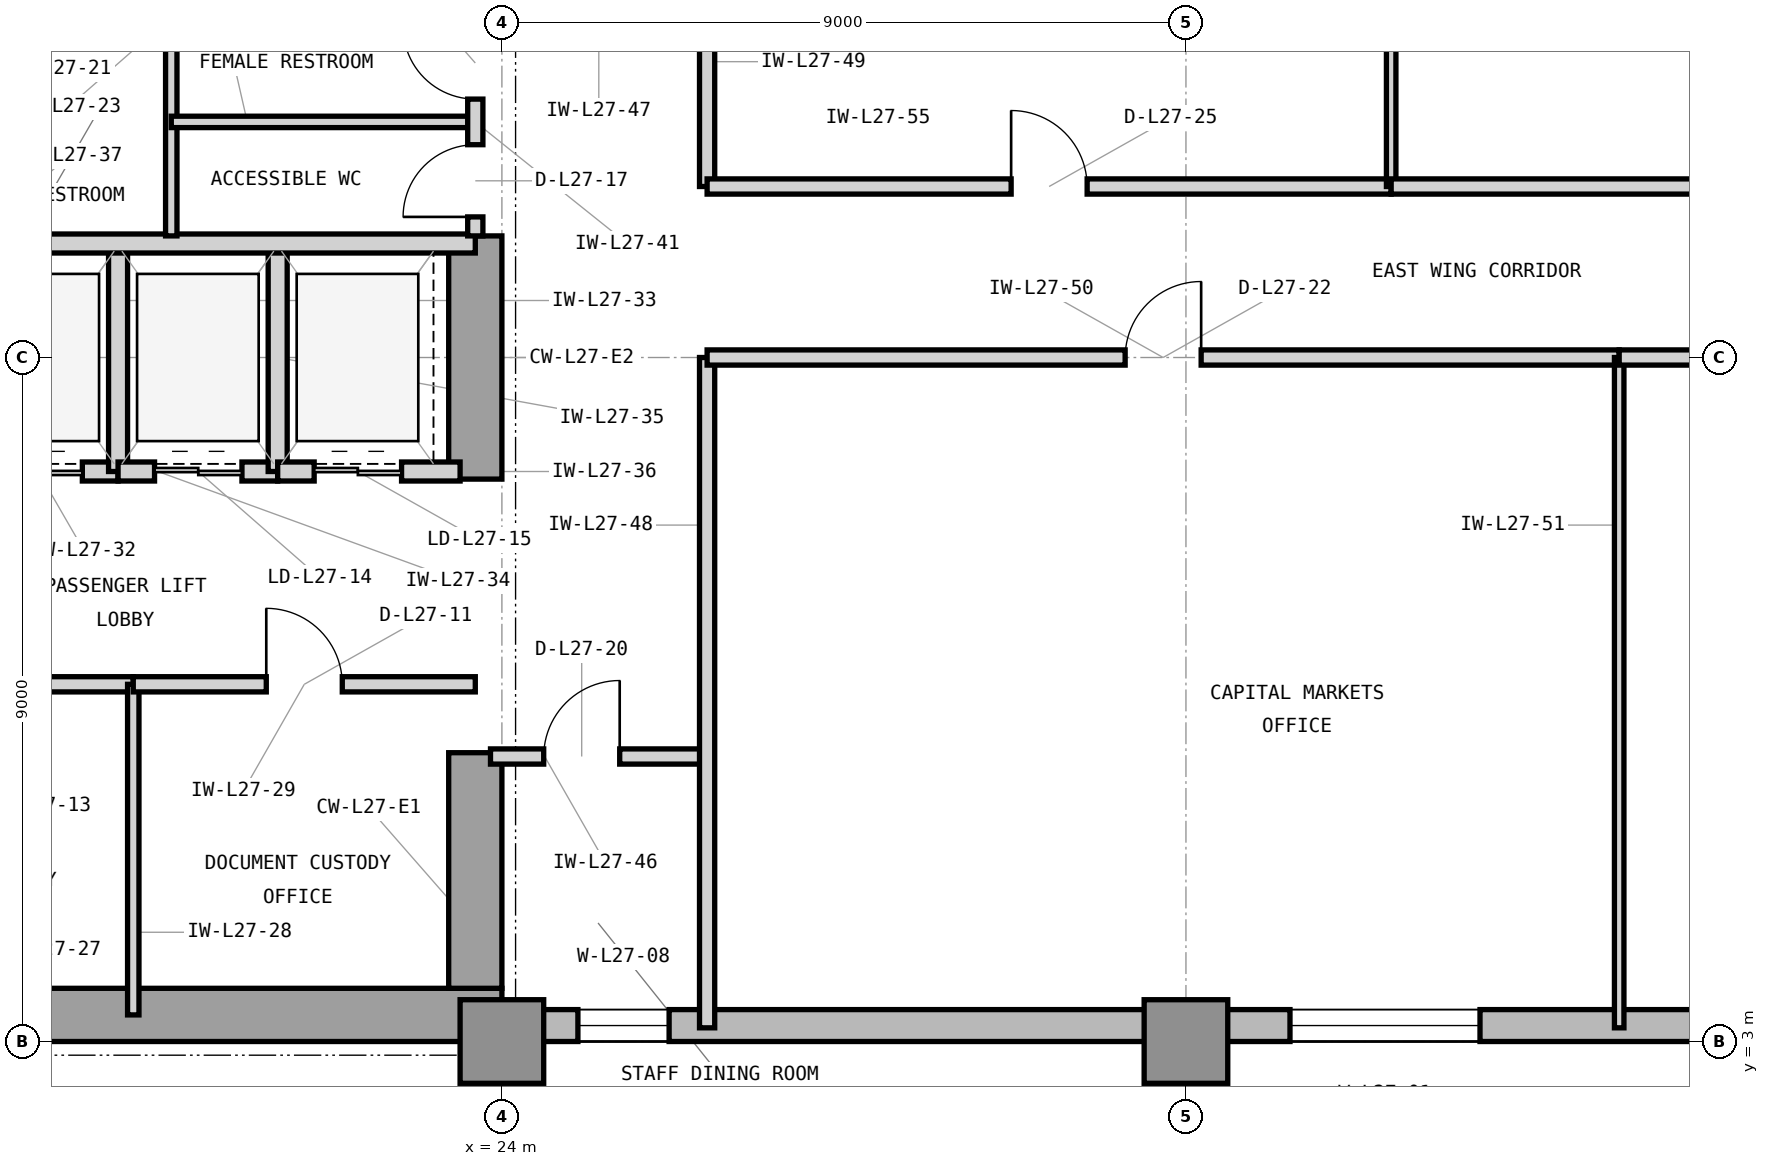
"""IFC4 building model, lengths in metres.
Left out: names, types, materials, properties, quantities, classifications, styles, units other than length and angle.
Written with IfcOpenShell. Run it as: python <this file> out.ifc"""

import sys

from ifc_helpers import new_model, si_unit, direction, frame, frame_2d, origin, origin_2d, place, context, subcontext, project, spatial, rectangle, extrude, element, fill, save


model = new_model("IFC4")
c1 = context("Model", 3, precision=1e-05, world=origin(), true_north=direction((0.0, 1.0)))
c2 = subcontext(c1, "Body", "Model", "MODEL_VIEW")
j1 = project(units=[si_unit("LENGTHUNIT", "METRE"), si_unit("PLANEANGLEUNIT", "RADIAN")], contexts=[c1])
p1 = place(None, origin())
s1 = spatial("IfcSite", under=j1, at=p1, CompositionType="ELEMENT")
p2 = place(p1, origin())
s2 = spatial("IfcBuilding", under=s1, at=p2, CompositionType="ELEMENT")
p3 = place(p2, frame((0.0, 0.0, 116.7)))
s3 = spatial("IfcBuildingStorey", under=s2, at=p3, CompositionType="ELEMENT", Elevation=116.7)
p4 = place(p3, frame((7.475, 3.35, 0.0), z_axis=(0.0, 0.0, 1.0), x_axis=(1.0, 0.0, 0.0)))
e1 = element("IfcWall", 1, at=p4, inside=s3, PredefinedType="SHEAR", context=c2, shape_type="SweptSolid", body=[
    extrude(rectangle(XDim=16.525, YDim=0.7, at=frame_2d((8.262, 0.0))), origin(), (0.0, 0.0, 1.0), 3.9),
])
p5 = place(p3, frame((23.65, 3.7, 0.0), z_axis=(0.0, 0.0, 1.0), x_axis=(0.0, 1.0, 0.0)))
e2 = element("IfcWall", 2, at=p5, inside=s3, PredefinedType="SHEAR", context=c2, shape_type="SweptSolid", body=[
    extrude(rectangle(XDim=3.1, YDim=0.7, at=frame_2d((1.55, 0.0))), origin(), (0.0, 0.0, 1.0), 3.9),
])
p6 = place(p3, frame((23.65, 10.4, 0.0), z_axis=(0.0, 0.0, 1.0), x_axis=(0.0, 1.0, 0.0)))
e3 = element("IfcWall", 3, at=p6, inside=s3, PredefinedType="SHEAR", context=c2, shape_type="SweptSolid", body=[
    extrude(rectangle(XDim=3.2, YDim=0.7, at=frame_2d((1.6, 0.0))), origin(), (0.0, 0.0, 1.0), 3.9),
])
for number, where, z_axis, x_axis in (
    (4, (24.0, 3.0, 0.0), (0.0, 0.0, 1.0), (1.0, 0.0, 0.0)),
    (5, (33.0, 3.0, 0.0), (0.0, 0.0, 1.0), (1.0, 0.0, 0.0)),
):
    element("IfcColumn", number, at=place(p3, frame(where, z_axis=z_axis, x_axis=x_axis)), inside=s3, PredefinedType="COLUMN", context=c2, shape_type="SweptSolid", body=[
        extrude(rectangle(XDim=1.1, YDim=1.1, at=origin_2d()), origin(), (0.0, 0.0, 1.0), 3.9),
    ])
p7 = place(p3, frame((23.9, 3.21, 0.0), z_axis=(0.0, 0.0, 1.0), x_axis=(1.0, 0.0, 0.0)))
e6 = element("IfcWall", 6, at=p7, inside=s3, PredefinedType="STANDARD", context=c2, shape_type="SweptSolid", body=[
    extrude(rectangle(XDim=37.5, YDim=0.42, at=frame_2d((18.75, 0.0))), origin(), (0.0, 0.0, 1.0), 3.7),
])
p8 = place(p7, frame((10.469, 0.0, 0.85)))
e7 = element("IfcOpeningElement", 7, at=p8, cuts=e6, PredefinedType="OPENING", context=c2, shape_type="SweptSolid", body=[
    extrude(rectangle(XDim=2.5, YDim=2.25, at=frame_2d((1.25, 1.125))), frame((0.0, 0.22, 0.0), z_axis=(0.0, -1.0, 0.0), x_axis=(1.0, 0.0, 0.0)), (0.0, 0.0, 1.0), 0.44),
])
p9 = place(p7, frame((19.844, 0.0, 0.85)))
e8 = element("IfcOpeningElement", 8, at=p9, cuts=e6, PredefinedType="OPENING", context=c2, shape_type="SweptSolid", body=[
    extrude(rectangle(XDim=2.5, YDim=2.25, at=frame_2d((1.25, 1.125))), frame((0.0, 0.22, 0.0), z_axis=(0.0, -1.0, 0.0), x_axis=(1.0, 0.0, 0.0)), (0.0, 0.0, 1.0), 0.44),
])
p10 = place(p7, frame((1.1, 0.0, 0.85)))
e9 = element("IfcOpeningElement", 9, at=p10, cuts=e6, PredefinedType="OPENING", context=c2, shape_type="SweptSolid", body=[
    extrude(rectangle(XDim=1.2, YDim=2.25, at=frame_2d((0.6, 1.125))), frame((0.0, 0.22, 0.0), z_axis=(0.0, -1.0, 0.0), x_axis=(1.0, 0.0, 0.0)), (0.0, 0.0, 1.0), 0.44),
])
p11 = place(p7, frame((28.036, 0.0, 0.85)))
e10 = element("IfcOpeningElement", 10, at=p11, cuts=e6, PredefinedType="OPENING", context=c2, shape_type="SweptSolid", body=[
    extrude(rectangle(XDim=1.2, YDim=2.25, at=frame_2d((0.6, 1.125))), frame((0.0, 0.22, 0.0), z_axis=(0.0, -1.0, 0.0), x_axis=(1.0, 0.0, 0.0)), (0.0, 0.0, 1.0), 0.44),
])
p12 = place(p3, frame((14.7, 7.7, 0.0), z_axis=(0.0, 0.0, 1.0), x_axis=(1.0, 0.0, 0.0)))
e11 = element("IfcWall", 11, at=p12, inside=s3, PredefinedType="PARTITIONING", context=c2, shape_type="SweptSolid", body=[
    extrude(rectangle(XDim=4.45, YDim=0.2, at=frame_2d((2.225, 0.0))), origin(), (0.0, 0.0, 1.0), 3.69),
])
p13 = place(p12, frame((1.75, 0.0, 0.0)))
e12 = element("IfcOpeningElement", 12, at=p13, cuts=e11, PredefinedType="OPENING", context=c2, shape_type="SweptSolid", body=[
    extrude(rectangle(XDim=0.95, YDim=2.1, at=frame_2d((0.475, 1.05))), frame((0.0, 0.11, 0.0), z_axis=(0.0, -1.0, 0.0), x_axis=(1.0, 0.0, 0.0)), (0.0, 0.0, 1.0), 0.22),
])
p14 = place(p3, frame((19.15, 3.35, 0.0), z_axis=(0.0, 0.0, 1.0), x_axis=(0.0, 1.0, 0.0)))
e13 = element("IfcWall", 13, at=p14, inside=s3, PredefinedType="PARTITIONING", context=c2, shape_type="SweptSolid", body=[
    extrude(rectangle(XDim=4.35, YDim=0.15, at=frame_2d((2.175, 0.0))), origin(), (0.0, 0.0, 1.0), 3.69),
])
p15 = place(p3, frame((19.15, 7.7, 0.0), z_axis=(0.0, 0.0, 1.0), x_axis=(1.0, 0.0, 0.0)))
e14 = element("IfcWall", 14, at=p15, inside=s3, PredefinedType="PARTITIONING", context=c2, shape_type="SweptSolid", body=[
    extrude(rectangle(XDim=4.5, YDim=0.2, at=frame_2d((2.25, 0.0))), origin(), (0.0, 0.0, 1.0), 3.69),
])
p16 = place(p15, frame((1.75, 0.0, 0.0)))
e15 = element("IfcOpeningElement", 15, at=p16, cuts=e14, PredefinedType="OPENING", context=c2, shape_type="SweptSolid", body=[
    extrude(rectangle(XDim=1.0, YDim=2.15, at=frame_2d((0.5, 1.075))), frame((0.0, 0.11, 0.0), z_axis=(0.0, -1.0, 0.0), x_axis=(1.0, 0.0, 0.0)), (0.0, 0.0, 1.0), 0.22),
])
p17 = place(p3, frame((16.85, 10.5, 0.0), z_axis=(0.0, 0.0, 1.0), x_axis=(1.0, 0.0, 0.0)))
e16 = element("IfcWall", 16, at=p17, inside=s3, PredefinedType="PARTITIONING", context=c2, shape_type="SweptSolid", body=[
    extrude(rectangle(XDim=2.1, YDim=0.25, at=frame_2d((1.05, 0.0))), origin(), (0.0, 0.0, 1.0), 3.227),
])
p18 = place(p17, frame((0.48, 0.0, 0.0)))
e17 = element("IfcOpeningElement", 17, at=p18, cuts=e16, PredefinedType="OPENING", context=c2, shape_type="SweptSolid", body=[
    extrude(rectangle(XDim=1.15, YDim=2.25, at=frame_2d((0.575, 1.125))), frame((0.0, 0.135, 0.0), z_axis=(0.0, -1.0, 0.0), x_axis=(1.0, 0.0, 0.0)), (0.0, 0.0, 1.0), 0.27),
])
p19 = place(p3, frame((18.95, 10.5, 0.0), z_axis=(0.0, 0.0, 1.0), x_axis=(0.0, 1.0, 0.0)))
e18 = element("IfcWall", 18, at=p19, inside=s3, PredefinedType="PARTITIONING", context=c2, shape_type="SweptSolid", body=[
    extrude(rectangle(XDim=3.0, YDim=0.25, at=frame_2d((1.5, 0.0))), origin(), (0.0, 0.0, 1.0), 3.69),
])
p20 = place(p3, frame((18.95, 10.5, 0.0), z_axis=(0.0, 0.0, 1.0), x_axis=(1.0, 0.0, 0.0)))
e19 = element("IfcWall", 19, at=p20, inside=s3, PredefinedType="PARTITIONING", context=c2, shape_type="SweptSolid", body=[
    extrude(rectangle(XDim=2.1, YDim=0.25, at=frame_2d((1.05, 0.0))), origin(), (0.0, 0.0, 1.0), 3.227),
])
p21 = place(p20, frame((0.48, 0.0, 0.0)))
e20 = element("IfcOpeningElement", 20, at=p21, cuts=e19, PredefinedType="OPENING", context=c2, shape_type="SweptSolid", body=[
    extrude(rectangle(XDim=1.15, YDim=2.25, at=frame_2d((0.575, 1.125))), frame((0.0, 0.135, 0.0), z_axis=(0.0, -1.0, 0.0), x_axis=(1.0, 0.0, 0.0)), (0.0, 0.0, 1.0), 0.27),
])
p22 = place(p3, frame((21.05, 10.5, 0.0), z_axis=(0.0, 0.0, 1.0), x_axis=(0.0, 1.0, 0.0)))
e21 = element("IfcWall", 21, at=p22, inside=s3, PredefinedType="PARTITIONING", context=c2, shape_type="SweptSolid", body=[
    extrude(rectangle(XDim=3.0, YDim=0.25, at=frame_2d((1.5, 0.0))), origin(), (0.0, 0.0, 1.0), 3.69),
])
p23 = place(p3, frame((21.05, 10.5, 0.0), z_axis=(0.0, 0.0, 1.0), x_axis=(1.0, 0.0, 0.0)))
e22 = element("IfcWall", 22, at=p23, inside=s3, PredefinedType="PARTITIONING", context=c2, shape_type="SweptSolid", body=[
    extrude(rectangle(XDim=2.4, YDim=0.25, at=frame_2d((1.2, 0.0))), origin(), (0.0, 0.0, 1.0), 3.227),
])
p24 = place(p23, frame((0.48, 0.0, 0.0)))
e23 = element("IfcOpeningElement", 23, at=p24, cuts=e22, PredefinedType="OPENING", context=c2, shape_type="SweptSolid", body=[
    extrude(rectangle(XDim=1.15, YDim=2.25, at=frame_2d((0.575, 1.125))), frame((0.0, 0.135, 0.0), z_axis=(0.0, -1.0, 0.0), x_axis=(1.0, 0.0, 0.0)), (0.0, 0.0, 1.0), 0.27),
])
p25 = place(p3, frame((14.7, 13.5, 0.0), z_axis=(0.0, 0.0, 1.0), x_axis=(1.0, 0.0, 0.0)))
e24 = element("IfcWall", 24, at=p25, inside=s3, PredefinedType="PARTITIONING", context=c2, shape_type="SweptSolid", body=[
    extrude(rectangle(XDim=8.95, YDim=0.25, at=frame_2d((4.475, 0.0))), origin(), (0.0, 0.0, 1.0), 3.227),
])
p26 = place(p3, frame((19.65, 13.6, 0.0), z_axis=(0.0, 0.0, 1.0), x_axis=(0.0, 1.0, 0.0)))
e25 = element("IfcWall", 25, at=p26, inside=s3, PredefinedType="PARTITIONING", context=c2, shape_type="SweptSolid", body=[
    extrude(rectangle(XDim=3.0, YDim=0.15, at=frame_2d((1.5, 0.0))), origin(), (0.0, 0.0, 1.0), 3.69),
])
p27 = place(p3, frame((19.65, 15.1, 0.0), z_axis=(0.0, 0.0, 1.0), x_axis=(1.0, 0.0, 0.0)))
e26 = element("IfcWall", 26, at=p27, inside=s3, PredefinedType="PARTITIONING", context=c2, shape_type="SweptSolid", body=[
    extrude(rectangle(XDim=4.0, YDim=0.15, at=frame_2d((2.0, 0.0))), origin(), (0.0, 0.0, 1.0), 3.69),
])
p28 = place(p3, frame((23.65, 13.6, 0.0), z_axis=(0.0, 0.0, 1.0), x_axis=(0.0, 1.0, 0.0)))
e27 = element("IfcWall", 27, at=p28, inside=s3, PredefinedType="PARTITIONING", context=c2, shape_type="SweptSolid", body=[
    extrude(rectangle(XDim=3.0, YDim=0.2, at=frame_2d((1.5, 0.0))), origin(), (0.0, 0.0, 1.0), 3.69),
])
p29 = place(p28, frame((0.25, 0.0, 0.0)))
e28 = element("IfcOpeningElement", 28, at=p29, cuts=e27, PredefinedType="OPENING", context=c2, shape_type="SweptSolid", body=[
    extrude(rectangle(XDim=0.95, YDim=2.1, at=frame_2d((0.475, 1.05))), frame((0.0, 0.11, 0.0), z_axis=(0.0, -1.0, 0.0), x_axis=(1.0, 0.0, 0.0)), (0.0, 0.0, 1.0), 0.22),
])
p30 = place(p28, frame((1.8, 0.0, 0.0)))
e29 = element("IfcOpeningElement", 29, at=p30, cuts=e27, PredefinedType="OPENING", context=c2, shape_type="SweptSolid", body=[
    extrude(rectangle(XDim=0.95, YDim=2.1, at=frame_2d((0.475, 1.05))), frame((0.0, 0.11, 0.0), z_axis=(0.0, -1.0, 0.0), x_axis=(1.0, 0.0, 0.0)), (0.0, 0.0, 1.0), 0.22),
])
p31 = place(p3, frame((23.85, 6.75, 0.0), z_axis=(0.0, 0.0, 1.0), x_axis=(1.0, 0.0, 0.0)))
e30 = element("IfcWall", 30, at=p31, inside=s3, PredefinedType="PARTITIONING", context=c2, shape_type="SweptSolid", body=[
    extrude(rectangle(XDim=2.85, YDim=0.2, at=frame_2d((1.425, 0.0))), origin(), (0.0, 0.0, 1.0), 3.69),
])
p32 = place(p31, frame((0.7, 0.0, 0.0)))
e31 = element("IfcOpeningElement", 31, at=p32, cuts=e30, PredefinedType="OPENING", context=c2, shape_type="SweptSolid", body=[
    extrude(rectangle(XDim=1.0, YDim=2.15, at=frame_2d((0.5, 1.075))), frame((0.0, 0.11, 0.0), z_axis=(0.0, -1.0, 0.0), x_axis=(1.0, 0.0, 0.0)), (0.0, 0.0, 1.0), 0.22),
])
p33 = place(p3, frame((26.7, 3.18, 0.0), z_axis=(0.0, 0.0, 1.0), x_axis=(0.0, 1.0, 0.0)))
e32 = element("IfcWall", 32, at=p33, inside=s3, PredefinedType="PARTITIONING", context=c2, shape_type="SweptSolid", body=[
    extrude(rectangle(XDim=8.82, YDim=0.2, at=frame_2d((4.41, 0.0))), origin(), (0.0, 0.0, 1.0), 3.69),
])
p34 = place(p3, frame((26.7, 14.25, 0.0), z_axis=(0.0, 0.0, 1.0), x_axis=(0.0, 1.0, 0.0)))
e33 = element("IfcWall", 33, at=p34, inside=s3, PredefinedType="PARTITIONING", context=c2, shape_type="SweptSolid", body=[
    extrude(rectangle(XDim=6.57, YDim=0.2, at=frame_2d((3.285, 0.0))), origin(), (0.0, 0.0, 1.0), 3.69),
])
p35 = place(p3, frame((26.7, 12.0, 0.0), z_axis=(0.0, 0.0, 1.0), x_axis=(1.0, 0.0, 0.0)))
e34 = element("IfcWall", 34, at=p35, inside=s3, PredefinedType="PARTITIONING", context=c2, shape_type="SweptSolid", body=[
    extrude(rectangle(XDim=12.0, YDim=0.2, at=frame_2d((6.0, 0.0))), origin(), (0.0, 0.0, 1.0), 3.227),
])
p36 = place(p35, frame((5.5, 0.0, 0.0)))
e35 = element("IfcOpeningElement", 35, at=p36, cuts=e34, PredefinedType="OPENING", context=c2, shape_type="SweptSolid", body=[
    extrude(rectangle(XDim=1.0, YDim=2.15, at=frame_2d((0.5, 1.075))), frame((0.0, 0.11, 0.0), z_axis=(0.0, -1.0, 0.0), x_axis=(1.0, 0.0, 0.0)), (0.0, 0.0, 1.0), 0.22),
])
p37 = place(p3, frame((38.7, 3.18, 0.0), z_axis=(0.0, 0.0, 1.0), x_axis=(0.0, 1.0, 0.0)))
e36 = element("IfcWall", 36, at=p37, inside=s3, PredefinedType="PARTITIONING", context=c2, shape_type="SweptSolid", body=[
    extrude(rectangle(XDim=8.82, YDim=0.125, at=frame_2d((4.41, 0.0))), origin(), (0.0, 0.0, 1.0), 3.69),
])
p38 = place(p3, frame((38.7, 12.0, 0.0), z_axis=(0.0, 0.0, 1.0), x_axis=(1.0, 0.0, 0.0)))
e37 = element("IfcWall", 37, at=p38, inside=s3, PredefinedType="PARTITIONING", context=c2, shape_type="SweptSolid", body=[
    extrude(rectangle(XDim=10.5, YDim=0.2, at=frame_2d((5.25, 0.0))), origin(), (0.0, 0.0, 1.0), 3.227),
])
p39 = place(p38, frame((4.75, 0.0, 0.0)))
e38 = element("IfcOpeningElement", 38, at=p39, cuts=e37, PredefinedType="OPENING", context=c2, shape_type="SweptSolid", body=[
    extrude(rectangle(XDim=1.0, YDim=2.15, at=frame_2d((0.5, 1.075))), frame((0.0, 0.11, 0.0), z_axis=(0.0, -1.0, 0.0), x_axis=(1.0, 0.0, 0.0)), (0.0, 0.0, 1.0), 0.22),
])
p40 = place(p3, frame((26.7, 14.25, 0.0), z_axis=(0.0, 0.0, 1.0), x_axis=(1.0, 0.0, 0.0)))
e39 = element("IfcWall", 39, at=p40, inside=s3, PredefinedType="PARTITIONING", context=c2, shape_type="SweptSolid", body=[
    extrude(rectangle(XDim=9.0, YDim=0.2, at=frame_2d((4.5, 0.0))), origin(), (0.0, 0.0, 1.0), 3.69),
])
p41 = place(p40, frame((4.0, 0.0, 0.0)))
e40 = element("IfcOpeningElement", 40, at=p41, cuts=e39, PredefinedType="OPENING", context=c2, shape_type="SweptSolid", body=[
    extrude(rectangle(XDim=1.0, YDim=2.15, at=frame_2d((0.5, 1.075))), frame((0.0, 0.11, 0.0), z_axis=(0.0, -1.0, 0.0), x_axis=(1.0, 0.0, 0.0)), (0.0, 0.0, 1.0), 0.22),
])
p42 = place(p3, frame((35.7, 14.25, 0.0), z_axis=(0.0, 0.0, 1.0), x_axis=(0.0, 1.0, 0.0)))
e41 = element("IfcWall", 41, at=p42, inside=s3, PredefinedType="PARTITIONING", context=c2, shape_type="SweptSolid", body=[
    extrude(rectangle(XDim=6.57, YDim=0.125, at=frame_2d((3.285, 0.0))), origin(), (0.0, 0.0, 1.0), 3.69),
])
p43 = place(p3, frame((35.7, 14.25, 0.0), z_axis=(0.0, 0.0, 1.0), x_axis=(1.0, 0.0, 0.0)))
e42 = element("IfcWall", 42, at=p43, inside=s3, PredefinedType="PARTITIONING", context=c2, shape_type="SweptSolid", body=[
    extrude(rectangle(XDim=10.5, YDim=0.2, at=frame_2d((5.25, 0.0))), origin(), (0.0, 0.0, 1.0), 3.69),
])
p44 = place(p43, frame((4.5, 0.0, 0.0)))
e43 = element("IfcOpeningElement", 43, at=p44, cuts=e42, PredefinedType="OPENING", context=c2, shape_type="SweptSolid", body=[
    extrude(rectangle(XDim=1.5, YDim=2.3, at=frame_2d((0.75, 1.15))), frame((0.0, 0.11, 0.0), z_axis=(0.0, -1.0, 0.0), x_axis=(1.0, 0.0, 0.0)), (0.0, 0.0, 1.0), 0.22),
])
p45 = place(p8, origin())
e44 = element("IfcWindow", 44, at=p45, inside=s3, PartitioningType="SINGLE_PANEL", PredefinedType="WINDOW", context=c2, shape_type="SweptSolid", body=[
    extrude(rectangle(XDim=2.5, YDim=2.25, at=frame_2d((1.25, 1.125))), frame((0.0, 0.11, 0.0), z_axis=(0.0, -1.0, 0.0), x_axis=(1.0, 0.0, 0.0)), (0.0, 0.0, 1.0), 0.06),
])
fill(e7, e44)
p46 = place(p16, origin())
e45 = element("IfcDoor", 45, at=p46, inside=s3, OperationType="SINGLE_SWING_LEFT", PredefinedType="DOOR", context=c2, shape_type="SweptSolid", body=[
    extrude(rectangle(XDim=1.0, YDim=2.15, at=frame_2d((0.5, 1.075))), frame((0.0, 0.025, 0.0), z_axis=(0.0, -1.0, 0.0), x_axis=(1.0, 0.0, 0.0)), (0.0, 0.0, 1.0), 0.05),
])
fill(e15, e45)
p47 = place(p18, origin())
e46 = element("IfcDoor", 46, at=p47, inside=s3, OperationType="DOUBLE_DOOR_SLIDING", PredefinedType="DOOR", context=c2, shape_type="SweptSolid", body=[
    extrude(rectangle(XDim=1.15, YDim=2.25, at=frame_2d((0.575, 1.125))), frame((0.0, 0.025, 0.0), z_axis=(0.0, -1.0, 0.0), x_axis=(1.0, 0.0, 0.0)), (0.0, 0.0, 1.0), 0.05),
])
fill(e17, e46)
p48 = place(p21, origin())
e47 = element("IfcDoor", 47, at=p48, inside=s3, OperationType="DOUBLE_DOOR_SLIDING", PredefinedType="DOOR", context=c2, shape_type="SweptSolid", body=[
    extrude(rectangle(XDim=1.15, YDim=2.25, at=frame_2d((0.575, 1.125))), frame((0.0, 0.025, 0.0), z_axis=(0.0, -1.0, 0.0), x_axis=(1.0, 0.0, 0.0)), (0.0, 0.0, 1.0), 0.05),
])
fill(e20, e47)
p49 = place(p24, origin())
e48 = element("IfcDoor", 48, at=p49, inside=s3, OperationType="DOUBLE_DOOR_SLIDING", PredefinedType="DOOR", context=c2, shape_type="SweptSolid", body=[
    extrude(rectangle(XDim=1.15, YDim=2.25, at=frame_2d((0.575, 1.125))), frame((0.0, 0.025, 0.0), z_axis=(0.0, -1.0, 0.0), x_axis=(1.0, 0.0, 0.0)), (0.0, 0.0, 1.0), 0.05),
])
fill(e23, e48)
p50 = place(p29, origin())
e49 = element("IfcDoor", 49, at=p50, inside=s3, OperationType="SINGLE_SWING_LEFT", PredefinedType="DOOR", context=c2, shape_type="SweptSolid", body=[
    extrude(rectangle(XDim=0.95, YDim=2.1, at=frame_2d((0.475, 1.05))), frame((0.0, 0.025, 0.0), z_axis=(0.0, -1.0, 0.0), x_axis=(1.0, 0.0, 0.0)), (0.0, 0.0, 1.0), 0.05),
])
fill(e28, e49)
p51 = place(p30, origin())
e50 = element("IfcDoor", 50, at=p51, inside=s3, OperationType="SINGLE_SWING_RIGHT", PredefinedType="DOOR", context=c2, shape_type="SweptSolid", body=[
    extrude(rectangle(XDim=0.95, YDim=2.1, at=frame_2d((0.475, 1.05))), frame((0.0, 0.025, 0.0), z_axis=(0.0, -1.0, 0.0), x_axis=(1.0, 0.0, 0.0)), (0.0, 0.0, 1.0), 0.05),
])
fill(e29, e50)
p52 = place(p32, origin())
e51 = element("IfcDoor", 51, at=p52, inside=s3, OperationType="SINGLE_SWING_RIGHT", PredefinedType="DOOR", context=c2, shape_type="SweptSolid", body=[
    extrude(rectangle(XDim=1.0, YDim=2.15, at=frame_2d((0.5, 1.075))), frame((0.0, 0.025, 0.0), z_axis=(0.0, -1.0, 0.0), x_axis=(1.0, 0.0, 0.0)), (0.0, 0.0, 1.0), 0.05),
])
fill(e31, e51)
p53 = place(p36, origin())
e52 = element("IfcDoor", 52, at=p53, inside=s3, OperationType="SINGLE_SWING_RIGHT", PredefinedType="DOOR", context=c2, shape_type="SweptSolid", body=[
    extrude(rectangle(XDim=1.0, YDim=2.15, at=frame_2d((0.5, 1.075))), frame((0.0, 0.025, 0.0), z_axis=(0.0, -1.0, 0.0), x_axis=(1.0, 0.0, 0.0)), (0.0, 0.0, 1.0), 0.05),
])
fill(e35, e52)
p54 = place(p41, origin())
e53 = element("IfcDoor", 53, at=p54, inside=s3, OperationType="SINGLE_SWING_LEFT", PredefinedType="DOOR", context=c2, shape_type="SweptSolid", body=[
    extrude(rectangle(XDim=1.0, YDim=2.15, at=frame_2d((0.5, 1.075))), frame((0.0, 0.025, 0.0), z_axis=(0.0, -1.0, 0.0), x_axis=(1.0, 0.0, 0.0)), (0.0, 0.0, 1.0), 0.05),
])
fill(e40, e53)
p55 = place(p10, origin())
e54 = element("IfcWindow", 54, at=p55, inside=s3, PartitioningType="SINGLE_PANEL", PredefinedType="WINDOW", context=c2, shape_type="SweptSolid", body=[
    extrude(rectangle(XDim=1.2, YDim=2.25, at=frame_2d((0.6, 1.125))), frame((0.0, 0.11, 0.0), z_axis=(0.0, -1.0, 0.0), x_axis=(1.0, 0.0, 0.0)), (0.0, 0.0, 1.0), 0.06),
])
fill(e9, e54)
save(model, sys.argv[1])
